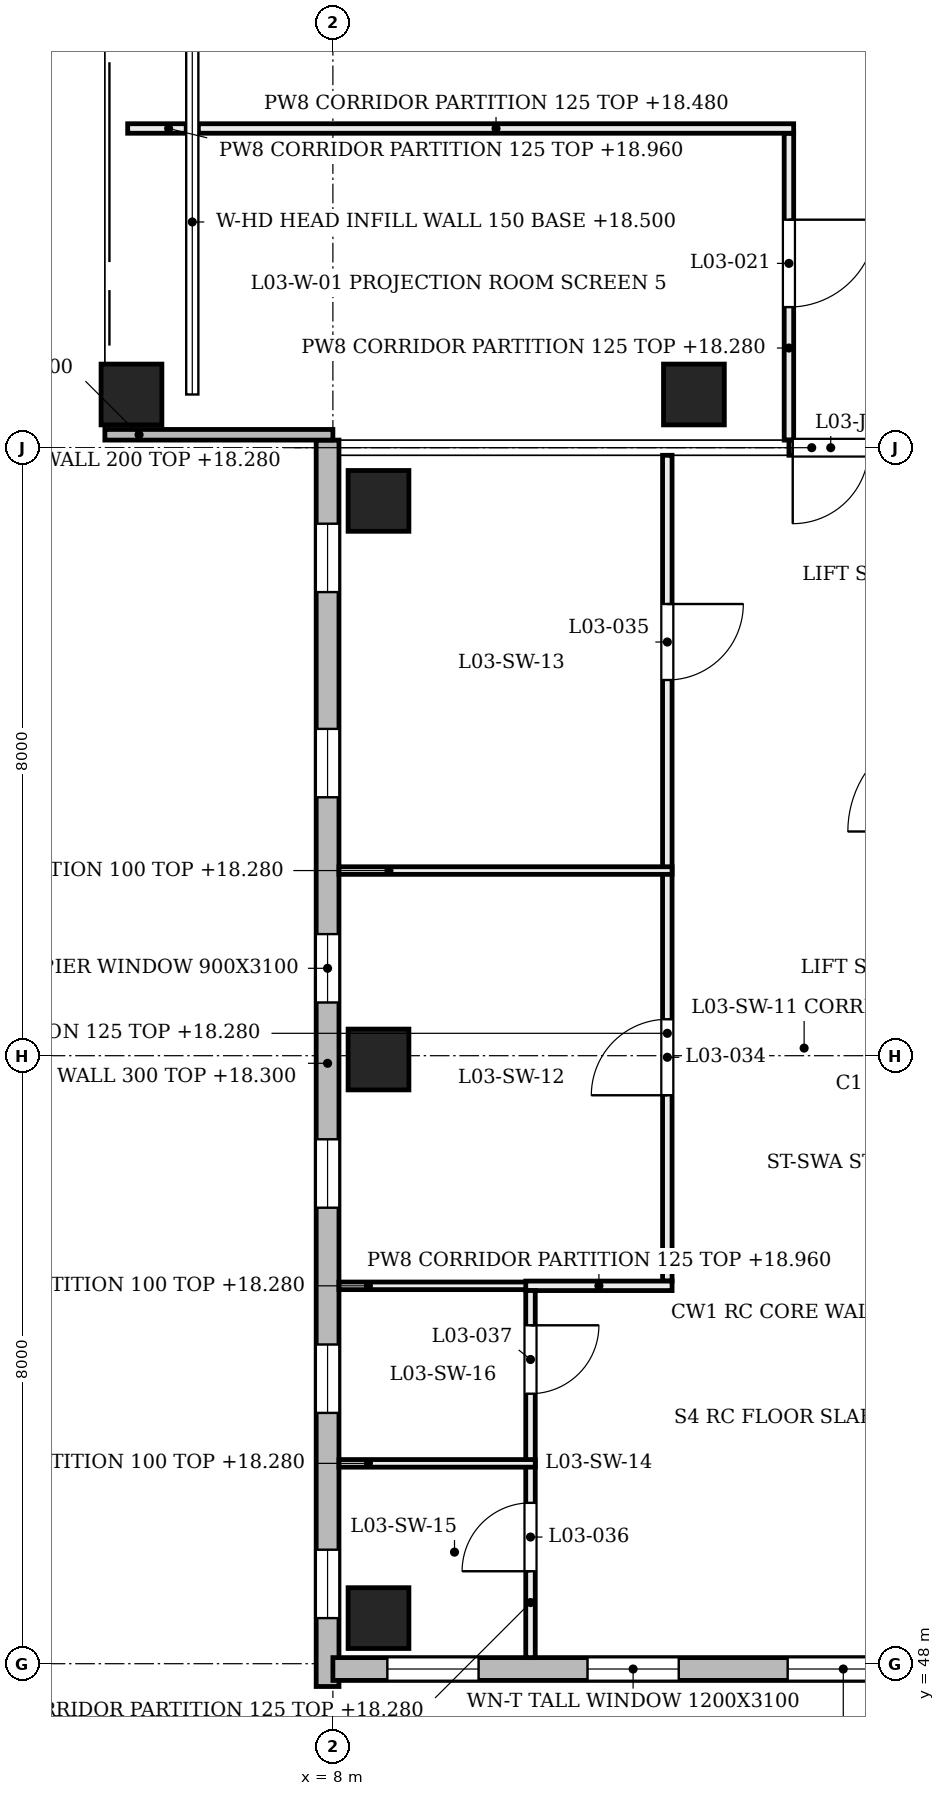
"""IFC4 building model, lengths in metres.
Left out: names, types, materials, properties, quantities, classifications, styles, units other than length and angle.
Written with IfcOpenShell. Run it as: python <this file> out.ifc"""

import sys

from ifc_helpers import new_model, si_unit, direction, frame, frame_2d, origin, origin_2d, place, context, subcontext, project, spatial, rectangle, extrude, element, fill, save


model = new_model("IFC4")
c1 = context("Model", 3, precision=1e-05, world=origin(), true_north=direction((0.0, 1.0)))
c2 = subcontext(c1, "Body", "Model", "MODEL_VIEW")
j1 = project(units=[si_unit("LENGTHUNIT", "METRE"), si_unit("PLANEANGLEUNIT", "RADIAN")], contexts=[c1])
p1 = place(None, origin())
s1 = spatial("IfcSite", under=j1, at=p1, CompositionType="ELEMENT")
p2 = place(p1, origin())
s2 = spatial("IfcBuilding", under=s1, at=p2, CompositionType="ELEMENT")
p3 = place(p2, frame((0.0, 0.0, 14.4)))
s3 = spatial("IfcBuildingStorey", under=s2, at=p3, CompositionType="ELEMENT", Elevation=14.4)
for number, where, z_axis, x_axis in (
    (1, (8.6, 48.6, 0.0), (0.0, 0.0, 1.0), (1.0, 0.0, 0.0)),
    (2, (8.6, 55.95, 0.0), (0.0, 0.0, 1.0), (1.0, 0.0, 0.0)),
    (3, (8.6, 63.3, 0.0), (0.0, 0.0, 1.0), (1.0, 0.0, 0.0)),
):
    element("IfcColumn", number, at=place(p3, frame(where, z_axis=z_axis, x_axis=x_axis)), inside=s3, PredefinedType="COLUMN", context=c2, shape_type="SweptSolid", body=[
        extrude(rectangle(XDim=0.8, YDim=0.8, at=origin_2d()), origin(), (0.0, 0.0, 1.0), 4.8),
    ])
for number, where, z_axis, x_axis in (
    (4, (5.6, 64.7, 0.0), (-0.204, 0.0, 0.979), (0.0, -1.0, 0.0)),
    (5, (13.0, 64.7, 0.0), (-0.204, 0.0, 0.979), (0.0, -1.0, 0.0)),
):
    element("IfcColumn", number, at=place(p3, frame(where, z_axis=z_axis, x_axis=x_axis)), inside=s3, PredefinedType="COLUMN", context=c2, shape_type="SweptSolid", body=[
        extrude(rectangle(XDim=0.8, YDim=0.8, at=origin_2d()), origin(), (0.0, 0.0, 1.0), 4.903),
    ])
p4 = place(p3, frame((6.15, 64.9, 4.1), z_axis=(0.0, 0.0, 1.0), x_axis=(0.0, 1.0, 0.0)))
e6 = element("IfcWall", 6, at=p4, inside=s3, PredefinedType="SOLIDWALL", context=c2, shape_type="SweptSolid", body=[
    extrude(rectangle(XDim=6.9, YDim=0.15, at=frame_2d((3.45, 0.0))), origin(), (0.0, 0.0, 1.0), 0.48),
])
p5 = place(p3, frame((7.93, 47.7, 0.0), z_axis=(0.0, 0.0, 1.0), x_axis=(0.0, 1.0, 0.0)))
e7 = element("IfcWall", 7, at=p5, inside=s3, PredefinedType="SOLIDWALL", context=c2, shape_type="SweptSolid", body=[
    extrude(rectangle(XDim=16.4, YDim=0.3, at=frame_2d((8.2, 0.0))), origin(), (0.0, 0.0, 1.0), 3.9),
])
p6 = place(p5, frame((0.9, 0.0, 0.75)))
e8 = element("IfcOpeningElement", 8, at=p6, cuts=e7, PredefinedType="OPENING", context=c2, shape_type="SweptSolid", body=[
    extrude(rectangle(XDim=0.9, YDim=3.1, at=frame_2d((0.45, 1.55))), frame((0.0, 0.16, 0.0), z_axis=(0.0, -1.0, 0.0), x_axis=(1.0, 0.0, 0.0)), (0.0, 0.0, 1.0), 0.32),
])
p7 = place(p5, frame((3.6, 0.0, 0.75)))
e9 = element("IfcOpeningElement", 9, at=p7, cuts=e7, PredefinedType="OPENING", context=c2, shape_type="SweptSolid", body=[
    extrude(rectangle(XDim=0.9, YDim=3.1, at=frame_2d((0.45, 1.55))), frame((0.0, 0.16, 0.0), z_axis=(0.0, -1.0, 0.0), x_axis=(1.0, 0.0, 0.0)), (0.0, 0.0, 1.0), 0.32),
])
p8 = place(p5, frame((6.3, 0.0, 0.75)))
e10 = element("IfcOpeningElement", 10, at=p8, cuts=e7, PredefinedType="OPENING", context=c2, shape_type="SweptSolid", body=[
    extrude(rectangle(XDim=0.9, YDim=3.1, at=frame_2d((0.45, 1.55))), frame((0.0, 0.16, 0.0), z_axis=(0.0, -1.0, 0.0), x_axis=(1.0, 0.0, 0.0)), (0.0, 0.0, 1.0), 0.32),
])
p9 = place(p5, frame((9.0, 0.0, 0.75)))
e11 = element("IfcOpeningElement", 11, at=p9, cuts=e7, PredefinedType="OPENING", context=c2, shape_type="SweptSolid", body=[
    extrude(rectangle(XDim=0.9, YDim=3.1, at=frame_2d((0.45, 1.55))), frame((0.0, 0.16, 0.0), z_axis=(0.0, -1.0, 0.0), x_axis=(1.0, 0.0, 0.0)), (0.0, 0.0, 1.0), 0.32),
])
p10 = place(p5, frame((11.7, 0.0, 0.75)))
e12 = element("IfcOpeningElement", 12, at=p10, cuts=e7, PredefinedType="OPENING", context=c2, shape_type="SweptSolid", body=[
    extrude(rectangle(XDim=0.9, YDim=3.1, at=frame_2d((0.45, 1.55))), frame((0.0, 0.16, 0.0), z_axis=(0.0, -1.0, 0.0), x_axis=(1.0, 0.0, 0.0)), (0.0, 0.0, 1.0), 0.32),
])
p11 = place(p5, frame((14.4, 0.0, 0.75)))
e13 = element("IfcOpeningElement", 13, at=p11, cuts=e7, PredefinedType="OPENING", context=c2, shape_type="SweptSolid", body=[
    extrude(rectangle(XDim=0.9, YDim=3.1, at=frame_2d((0.45, 1.55))), frame((0.0, 0.16, 0.0), z_axis=(0.0, -1.0, 0.0), x_axis=(1.0, 0.0, 0.0)), (0.0, 0.0, 1.0), 0.32),
])
p12 = place(p3, frame((8.0, 47.93, 0.0), z_axis=(0.0, 0.0, 1.0), x_axis=(1.0, 0.0, 0.0)))
e14 = element("IfcWall", 14, at=p12, inside=s3, PredefinedType="SOLIDWALL", context=c2, shape_type="SweptSolid", body=[
    extrude(rectangle(XDim=7.9, YDim=0.3, at=frame_2d((3.95, 0.0))), origin(), (0.0, 0.0, 1.0), 3.9),
])
p13 = place(p12, frame((0.717, 0.0, 0.75)))
e15 = element("IfcOpeningElement", 15, at=p13, cuts=e14, PredefinedType="OPENING", context=c2, shape_type="SweptSolid", body=[
    extrude(rectangle(XDim=1.2, YDim=3.1, at=frame_2d((0.6, 1.55))), frame((0.0, 0.16, 0.0), z_axis=(0.0, -1.0, 0.0), x_axis=(1.0, 0.0, 0.0)), (0.0, 0.0, 1.0), 0.32),
])
p14 = place(p12, frame((3.35, 0.0, 0.75)))
e16 = element("IfcOpeningElement", 16, at=p14, cuts=e14, PredefinedType="OPENING", context=c2, shape_type="SweptSolid", body=[
    extrude(rectangle(XDim=1.2, YDim=3.1, at=frame_2d((0.6, 1.55))), frame((0.0, 0.16, 0.0), z_axis=(0.0, -1.0, 0.0), x_axis=(1.0, 0.0, 0.0)), (0.0, 0.0, 1.0), 0.32),
])
p15 = place(p12, frame((5.983, 0.0, 0.75)))
e17 = element("IfcOpeningElement", 17, at=p15, cuts=e14, PredefinedType="OPENING", context=c2, shape_type="SweptSolid", body=[
    extrude(rectangle(XDim=1.2, YDim=3.1, at=frame_2d((0.6, 1.55))), frame((0.0, 0.16, 0.0), z_axis=(0.0, -1.0, 0.0), x_axis=(1.0, 0.0, 0.0)), (0.0, 0.0, 1.0), 0.32),
])
p16 = place(p3, frame((5.0, 64.17, 0.0), z_axis=(0.0, 0.0, 1.0), x_axis=(1.0, 0.0, 0.0)))
e18 = element("IfcWall", 18, at=p16, inside=s3, PredefinedType="SOLIDWALL", context=c2, shape_type="SweptSolid", body=[
    extrude(rectangle(XDim=3.0, YDim=0.14, at=frame_2d((1.5, 0.0))), origin(), (0.0, 0.0, 1.0), 3.9),
])
p17 = place(p3, frame((14.0, 64.1, 0.0), z_axis=(0.0, 0.0, 1.0), x_axis=(0.0, 1.0, 0.0)))
e19 = element("IfcWall", 19, at=p17, inside=s3, PredefinedType="PARTITIONING", context=c2, shape_type="SweptSolid", body=[
    extrude(rectangle(XDim=4.037, YDim=0.125, at=frame_2d((2.019, 0.0))), origin(), (0.0, 0.0, 1.0), 3.88),
])
p18 = place(p17, frame((1.75, 0.0, 0.0)))
e20 = element("IfcOpeningElement", 20, at=p18, cuts=e19, PredefinedType="OPENING", context=c2, shape_type="SweptSolid", body=[
    extrude(rectangle(XDim=1.15, YDim=2.1, at=frame_2d((0.575, 1.05))), frame((0.0, 0.073, 0.0), z_axis=(0.0, -1.0, 0.0), x_axis=(1.0, 0.0, 0.0)), (0.0, 0.0, 1.0), 0.145),
])
p19 = place(p3, frame((5.3, 68.2, 0.0), z_axis=(0.0, 0.0, 1.0), x_axis=(1.0, 0.0, 0.0)))
e21 = element("IfcWall", 21, at=p19, inside=s3, PredefinedType="PARTITIONING", context=c2, shape_type="SweptSolid", body=[
    extrude(rectangle(XDim=0.77, YDim=0.125, at=frame_2d((0.385, 0.0))), origin(), (0.0, 0.0, 1.0), 4.56),
])
p20 = place(p3, frame((6.23, 68.2, 0.0), z_axis=(0.0, 0.0, 1.0), x_axis=(1.0, 0.0, 0.0)))
e22 = element("IfcWall", 22, at=p20, inside=s3, PredefinedType="PARTITIONING", context=c2, shape_type="SweptSolid", body=[
    extrude(rectangle(XDim=7.833, YDim=0.125, at=frame_2d((3.916, 0.0))), origin(), (0.0, 0.0, 1.0), 4.08),
])
p21 = place(p3, frame((12.4, 53.035, 0.0), z_axis=(0.0, 0.0, 1.0), x_axis=(0.0, 1.0, 0.0)))
e23 = element("IfcWall", 23, at=p21, inside=s3, PredefinedType="PARTITIONING", context=c2, shape_type="SweptSolid", body=[
    extrude(rectangle(XDim=10.865, YDim=0.125, at=frame_2d((5.433, 0.0))), origin(), (0.0, 0.0, 1.0), 3.88),
])
p22 = place(p21, frame((2.444, 0.0, 0.0)))
e24 = element("IfcOpeningElement", 24, at=p22, cuts=e23, PredefinedType="OPENING", context=c2, shape_type="SweptSolid", body=[
    extrude(rectangle(XDim=1.0, YDim=2.1, at=frame_2d((0.5, 1.05))), frame((0.0, 0.073, 0.0), z_axis=(0.0, -1.0, 0.0), x_axis=(1.0, 0.0, 0.0)), (0.0, 0.0, 1.0), 0.145),
])
p23 = place(p21, frame((7.908, 0.0, 0.0)))
e25 = element("IfcOpeningElement", 25, at=p23, cuts=e23, PredefinedType="OPENING", context=c2, shape_type="SweptSolid", body=[
    extrude(rectangle(XDim=1.0, YDim=2.1, at=frame_2d((0.5, 1.05))), frame((0.0, 0.073, 0.0), z_axis=(0.0, -1.0, 0.0), x_axis=(1.0, 0.0, 0.0)), (0.0, 0.0, 1.0), 0.145),
])
p24 = place(p3, frame((8.08, 52.972, 0.0), z_axis=(0.0, 0.0, 1.0), x_axis=(1.0, 0.0, 0.0)))
e26 = element("IfcWall", 26, at=p24, inside=s3, PredefinedType="PARTITIONING", context=c2, shape_type="SweptSolid", body=[
    extrude(rectangle(XDim=2.583, YDim=0.1, at=frame_2d((1.291, 0.0))), origin(), (0.0, 0.0, 1.0), 3.88),
])
p25 = place(p3, frame((10.538, 52.972, 0.0), z_axis=(0.0, 0.0, 1.0), x_axis=(1.0, 0.0, 0.0)))
e27 = element("IfcWall", 27, at=p25, inside=s3, PredefinedType="PARTITIONING", context=c2, shape_type="SweptSolid", body=[
    extrude(rectangle(XDim=1.925, YDim=0.125, at=frame_2d((0.962, 0.0))), origin(), (0.0, 0.0, 1.0), 4.56),
])
p26 = place(p3, frame((8.08, 58.436, 0.0), z_axis=(0.0, 0.0, 1.0), x_axis=(1.0, 0.0, 0.0)))
e28 = element("IfcWall", 28, at=p26, inside=s3, PredefinedType="PARTITIONING", context=c2, shape_type="SweptSolid", body=[
    extrude(rectangle(XDim=4.382, YDim=0.1, at=frame_2d((2.191, 0.0))), origin(), (0.0, 0.0, 1.0), 3.88),
])
p27 = place(p3, frame((10.6, 48.08, 0.0), z_axis=(0.0, 0.0, 1.0), x_axis=(0.0, 1.0, 0.0)))
e29 = element("IfcWall", 29, at=p27, inside=s3, PredefinedType="PARTITIONING", context=c2, shape_type="SweptSolid", body=[
    extrude(rectangle(XDim=4.83, YDim=0.125, at=frame_2d((2.415, 0.0))), origin(), (0.0, 0.0, 1.0), 3.88),
])
p28 = place(p27, frame((1.136, 0.0, 0.0)))
e30 = element("IfcOpeningElement", 30, at=p28, cuts=e29, PredefinedType="OPENING", context=c2, shape_type="SweptSolid", body=[
    extrude(rectangle(XDim=0.9, YDim=2.1, at=frame_2d((0.45, 1.05))), frame((0.0, 0.073, 0.0), z_axis=(0.0, -1.0, 0.0), x_axis=(1.0, 0.0, 0.0)), (0.0, 0.0, 1.0), 0.145),
])
p29 = place(p27, frame((3.473, 0.0, 0.0)))
e31 = element("IfcOpeningElement", 31, at=p29, cuts=e29, PredefinedType="OPENING", context=c2, shape_type="SweptSolid", body=[
    extrude(rectangle(XDim=0.9, YDim=2.1, at=frame_2d((0.45, 1.05))), frame((0.0, 0.073, 0.0), z_axis=(0.0, -1.0, 0.0), x_axis=(1.0, 0.0, 0.0)), (0.0, 0.0, 1.0), 0.145),
])
p30 = place(p3, frame((8.08, 50.636, 0.0), z_axis=(0.0, 0.0, 1.0), x_axis=(1.0, 0.0, 0.0)))
e32 = element("IfcWall", 32, at=p30, inside=s3, PredefinedType="PARTITIONING", context=c2, shape_type="SweptSolid", body=[
    extrude(rectangle(XDim=2.583, YDim=0.1, at=frame_2d((1.291, 0.0))), origin(), (0.0, 0.0, 1.0), 3.88),
])
p31 = place(p3, frame((14.0, 64.0, 0.0), z_axis=(0.0, 0.0, 1.0), x_axis=(1.0, 0.0, 0.0)))
e33 = element("IfcWall", 33, at=p31, inside=s3, PredefinedType="PARTITIONING", context=c2, shape_type="SweptSolid", body=[
    extrude(rectangle(XDim=2.0, YDim=0.2, at=frame_2d((1.0, 0.0))), origin(), (0.0, 0.0, 1.0), 3.88),
])
p32 = place(p31, frame((0.05, 0.0, 0.0)))
e34 = element("IfcOpeningElement", 34, at=p32, cuts=e33, PredefinedType="OPENING", context=c2, shape_type="SweptSolid", body=[
    extrude(rectangle(XDim=1.0, YDim=2.1, at=frame_2d((0.5, 1.05))), frame((0.0, 0.11, 0.0), z_axis=(0.0, -1.0, 0.0), x_axis=(1.0, 0.0, 0.0)), (0.0, 0.0, 1.0), 0.22),
])
p33 = place(p6, origin())
e35 = element("IfcWindow", 35, at=p33, inside=s3, PartitioningType="SINGLE_PANEL", PredefinedType="WINDOW", context=c2, shape_type="SweptSolid", body=[
    extrude(rectangle(XDim=0.9, YDim=3.1, at=frame_2d((0.45, 1.55))), frame((0.0, 0.03, 0.0), z_axis=(0.0, -1.0, 0.0), x_axis=(1.0, 0.0, 0.0)), (0.0, 0.0, 1.0), 0.06),
])
fill(e8, e35)
p34 = place(p7, origin())
e36 = element("IfcWindow", 36, at=p34, inside=s3, PartitioningType="SINGLE_PANEL", PredefinedType="WINDOW", context=c2, shape_type="SweptSolid", body=[
    extrude(rectangle(XDim=0.9, YDim=3.1, at=frame_2d((0.45, 1.55))), frame((0.0, 0.03, 0.0), z_axis=(0.0, -1.0, 0.0), x_axis=(1.0, 0.0, 0.0)), (0.0, 0.0, 1.0), 0.06),
])
fill(e9, e36)
p35 = place(p8, origin())
e37 = element("IfcWindow", 37, at=p35, inside=s3, PartitioningType="SINGLE_PANEL", PredefinedType="WINDOW", context=c2, shape_type="SweptSolid", body=[
    extrude(rectangle(XDim=0.9, YDim=3.1, at=frame_2d((0.45, 1.55))), frame((0.0, 0.03, 0.0), z_axis=(0.0, -1.0, 0.0), x_axis=(1.0, 0.0, 0.0)), (0.0, 0.0, 1.0), 0.06),
])
fill(e10, e37)
p36 = place(p9, origin())
e38 = element("IfcWindow", 38, at=p36, inside=s3, PartitioningType="SINGLE_PANEL", PredefinedType="WINDOW", context=c2, shape_type="SweptSolid", body=[
    extrude(rectangle(XDim=0.9, YDim=3.1, at=frame_2d((0.45, 1.55))), frame((0.0, 0.03, 0.0), z_axis=(0.0, -1.0, 0.0), x_axis=(1.0, 0.0, 0.0)), (0.0, 0.0, 1.0), 0.06),
])
fill(e11, e38)
p37 = place(p10, origin())
e39 = element("IfcWindow", 39, at=p37, inside=s3, PartitioningType="SINGLE_PANEL", PredefinedType="WINDOW", context=c2, shape_type="SweptSolid", body=[
    extrude(rectangle(XDim=0.9, YDim=3.1, at=frame_2d((0.45, 1.55))), frame((0.0, 0.03, 0.0), z_axis=(0.0, -1.0, 0.0), x_axis=(1.0, 0.0, 0.0)), (0.0, 0.0, 1.0), 0.06),
])
fill(e12, e39)
p38 = place(p11, origin())
e40 = element("IfcWindow", 40, at=p38, inside=s3, PartitioningType="SINGLE_PANEL", PredefinedType="WINDOW", context=c2, shape_type="SweptSolid", body=[
    extrude(rectangle(XDim=0.9, YDim=3.1, at=frame_2d((0.45, 1.55))), frame((0.0, 0.03, 0.0), z_axis=(0.0, -1.0, 0.0), x_axis=(1.0, 0.0, 0.0)), (0.0, 0.0, 1.0), 0.06),
])
fill(e13, e40)
p39 = place(p13, origin())
e41 = element("IfcWindow", 41, at=p39, inside=s3, PartitioningType="SINGLE_PANEL", PredefinedType="WINDOW", context=c2, shape_type="SweptSolid", body=[
    extrude(rectangle(XDim=1.2, YDim=3.1, at=frame_2d((0.6, 1.55))), frame((0.0, 0.03, 0.0), z_axis=(0.0, -1.0, 0.0), x_axis=(1.0, 0.0, 0.0)), (0.0, 0.0, 1.0), 0.06),
])
fill(e15, e41)
p40 = place(p14, origin())
e42 = element("IfcWindow", 42, at=p40, inside=s3, PartitioningType="SINGLE_PANEL", PredefinedType="WINDOW", context=c2, shape_type="SweptSolid", body=[
    extrude(rectangle(XDim=1.2, YDim=3.1, at=frame_2d((0.6, 1.55))), frame((0.0, 0.03, 0.0), z_axis=(0.0, -1.0, 0.0), x_axis=(1.0, 0.0, 0.0)), (0.0, 0.0, 1.0), 0.06),
])
fill(e16, e42)
p41 = place(p15, origin())
e43 = element("IfcWindow", 43, at=p41, inside=s3, PartitioningType="SINGLE_PANEL", PredefinedType="WINDOW", context=c2, shape_type="SweptSolid", body=[
    extrude(rectangle(XDim=1.2, YDim=3.1, at=frame_2d((0.6, 1.55))), frame((0.0, 0.03, 0.0), z_axis=(0.0, -1.0, 0.0), x_axis=(1.0, 0.0, 0.0)), (0.0, 0.0, 1.0), 0.06),
])
fill(e17, e43)
p42 = place(p18, origin())
e44 = element("IfcDoor", 44, at=p42, inside=s3, OperationType="SINGLE_SWING_RIGHT", PredefinedType="DOOR", context=c2, shape_type="SweptSolid", body=[
    extrude(rectangle(XDim=1.15, YDim=2.1, at=frame_2d((0.575, 1.05))), frame((0.0, 0.025, 0.0), z_axis=(0.0, -1.0, 0.0), x_axis=(1.0, 0.0, 0.0)), (0.0, 0.0, 1.0), 0.05),
])
fill(e20, e44)
p43 = place(p22, origin())
e45 = element("IfcDoor", 45, at=p43, inside=s3, OperationType="SINGLE_SWING_LEFT", PredefinedType="DOOR", context=c2, shape_type="SweptSolid", body=[
    extrude(rectangle(XDim=1.0, YDim=2.1, at=frame_2d((0.5, 1.05))), frame((0.0, 0.025, 0.0), z_axis=(0.0, -1.0, 0.0), x_axis=(1.0, 0.0, 0.0)), (0.0, 0.0, 1.0), 0.05),
])
fill(e24, e45)
p44 = place(p23, origin())
e46 = element("IfcDoor", 46, at=p44, inside=s3, OperationType="SINGLE_SWING_RIGHT", PredefinedType="DOOR", context=c2, shape_type="SweptSolid", body=[
    extrude(rectangle(XDim=1.0, YDim=2.1, at=frame_2d((0.5, 1.05))), frame((0.0, 0.025, 0.0), z_axis=(0.0, -1.0, 0.0), x_axis=(1.0, 0.0, 0.0)), (0.0, 0.0, 1.0), 0.05),
])
fill(e25, e46)
p45 = place(p28, origin())
e47 = element("IfcDoor", 47, at=p45, inside=s3, OperationType="SINGLE_SWING_LEFT", PredefinedType="DOOR", context=c2, shape_type="SweptSolid", body=[
    extrude(rectangle(XDim=0.9, YDim=2.1, at=frame_2d((0.45, 1.05))), frame((0.0, 0.025, 0.0), z_axis=(0.0, -1.0, 0.0), x_axis=(1.0, 0.0, 0.0)), (0.0, 0.0, 1.0), 0.05),
])
fill(e30, e47)
p46 = place(p29, origin())
e48 = element("IfcDoor", 48, at=p46, inside=s3, OperationType="SINGLE_SWING_RIGHT", PredefinedType="DOOR", context=c2, shape_type="SweptSolid", body=[
    extrude(rectangle(XDim=0.9, YDim=2.1, at=frame_2d((0.45, 1.05))), frame((0.0, 0.025, 0.0), z_axis=(0.0, -1.0, 0.0), x_axis=(1.0, 0.0, 0.0)), (0.0, 0.0, 1.0), 0.05),
])
fill(e31, e48)
p47 = place(p32, frame((1.0, 0.0, 0.0), z_axis=(0.0, 0.0, 1.0), x_axis=(-1.0, 0.0, 0.0)))
e49 = element("IfcDoor", 49, at=p47, inside=s3, OperationType="SINGLE_SWING_LEFT", PredefinedType="DOOR", context=c2, shape_type="SweptSolid", body=[
    extrude(rectangle(XDim=1.0, YDim=2.1, at=frame_2d((0.5, 1.05))), frame((0.0, 0.025, 0.0), z_axis=(0.0, -1.0, 0.0), x_axis=(1.0, 0.0, 0.0)), (0.0, 0.0, 1.0), 0.05),
])
fill(e34, e49)
save(model, sys.argv[1])
